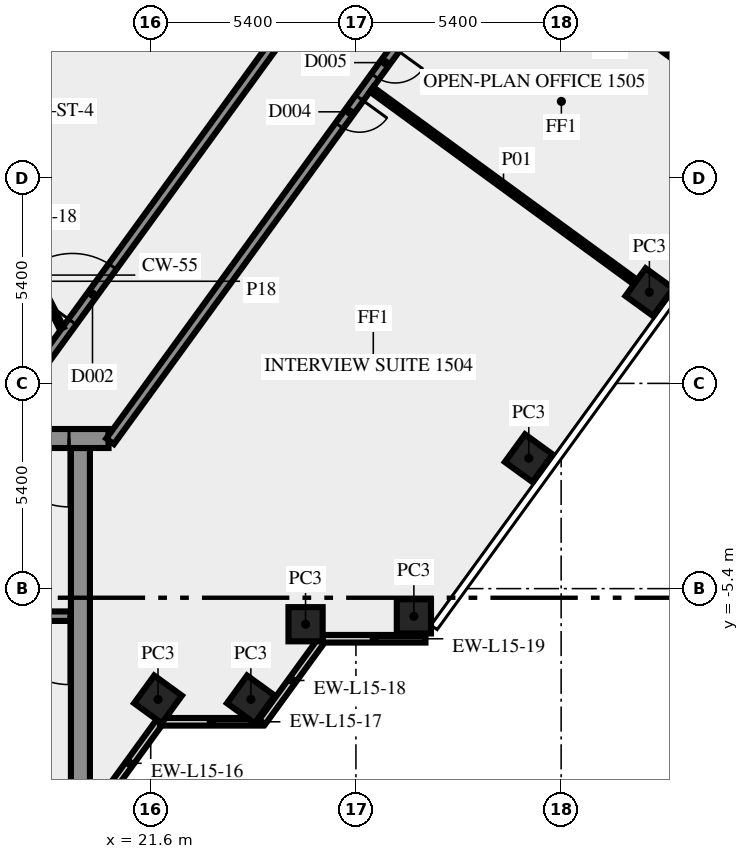
"""IFC4 building model, lengths in metres.
Left out: names, types, materials, properties, quantities, classifications, styles, units other than length and angle.
Written with IfcOpenShell. Run it as: python <this file> out.ifc"""

import sys

from ifc_helpers import new_model, si_unit, direction, frame, frame_2d, origin, origin_2d, place, context, subcontext, project, spatial, rectangle, extrude, element, fill, save


model = new_model("IFC4")
c1 = context("Model", 3, precision=1e-05, world=origin(), true_north=direction((0.0, 1.0)))
c2 = subcontext(c1, "Body", "Model", "MODEL_VIEW")
j1 = project(units=[si_unit("LENGTHUNIT", "METRE"), si_unit("PLANEANGLEUNIT", "RADIAN")], contexts=[c1])
p1 = place(None, origin())
s1 = spatial("IfcSite", under=j1, at=p1, CompositionType="ELEMENT")
p2 = place(p1, origin())
s2 = spatial("IfcBuilding", under=s1, at=p2, CompositionType="ELEMENT")
p3 = place(p2, frame((0.0, 0.0, 67.0)))
s3 = spatial("IfcBuildingStorey", under=s2, at=p3, CompositionType="ELEMENT", Elevation=67.0)
for number, where, z_axis, x_axis in (
    (1, (21.792, -8.315, 0.0), (0.0, 0.0, 1.0), (0.588, 0.809, 0.0)),
    (2, (24.235, -8.315, 0.0), (0.0, 0.0, 1.0), (0.588, 0.809, 0.0)),
    (3, (25.674, -6.337, 0.0), (0.0, 0.0, 1.0), (1.0, 0.0, 0.0)),
    (4, (28.525, -6.13, 0.0), (0.0, 0.0, 1.0), (1.0, 0.0, 0.0)),
    (5, (31.548, -1.969, 0.0), (0.0, 0.0, 1.0), (0.588, 0.809, 0.0)),
    (6, (34.722, 2.4, 0.0), (0.0, 0.0, 1.0), (0.588, 0.809, 0.0)),
):
    element("IfcColumn", number, at=place(p3, frame(where, z_axis=z_axis, x_axis=x_axis)), inside=s3, PredefinedType="COLUMN", context=c2, shape_type="SweptSolid", body=[
        extrude(rectangle(XDim=0.9, YDim=0.9, at=origin_2d()), origin(), (0.0, 0.0, 1.0), 3.65),
    ])
p4 = place(p3, frame((20.253, -11.083, 0.0), z_axis=(0.0, 0.0, 1.0), x_axis=(0.587766567315, 0.809030569476, 0.0)))
e7 = element("IfcWall", 7, at=p4, inside=s3, PredefinedType="SOLIDWALL", context=c2, shape_type="SweptSolid", body=[
    extrude(rectangle(XDim=2.688, YDim=0.2, at=frame_2d((1.344, 0.0))), origin(), (0.0, 0.0, 1.0), 3.65),
])
p5 = place(p3, frame((21.843, -8.904, 0.0), z_axis=(0.0, 0.0, 1.0), x_axis=(1.0, 0.0, 0.0)))
e8 = element("IfcWall", 8, at=p5, inside=s3, PredefinedType="SOLIDWALL", context=c2, shape_type="SweptSolid", body=[
    extrude(rectangle(XDim=2.7, YDim=0.2, at=frame_2d((1.35, 0.0))), origin(), (0.0, 0.0, 1.0), 3.65),
])
p6 = place(p3, frame((24.533, -8.909, 0.0), z_axis=(0.0, 0.0, 1.0), x_axis=(0.587720002413, 0.809064397168, 0.0)))
e9 = element("IfcWall", 9, at=p6, inside=s3, PredefinedType="SOLIDWALL", context=c2, shape_type="SweptSolid", body=[
    extrude(rectangle(XDim=2.7, YDim=0.2, at=frame_2d((1.35, 0.0))), origin(), (0.0, 0.0, 1.0), 3.65),
])
p7 = place(p3, frame((26.13, -6.719, 0.0), z_axis=(0.0, 0.0, 1.0), x_axis=(1.0, 0.0, 0.0)))
e10 = element("IfcWall", 10, at=p7, inside=s3, PredefinedType="SOLIDWALL", context=c2, shape_type="SweptSolid", body=[
    extrude(rectangle(XDim=2.7, YDim=0.2, at=frame_2d((1.35, 0.0))), origin(), (0.0, 0.0, 1.0), 3.65),
])
p8 = place(p3, frame((19.75, -10.5, 0.0), z_axis=(0.0, 0.0, 1.0), x_axis=(0.0, 1.0, 0.0)))
e11 = element("IfcWall", 11, at=p8, inside=s3, PredefinedType="SHEAR", context=c2, shape_type="SweptSolid", body=[
    extrude(rectangle(XDim=8.8, YDim=0.5, at=frame_2d((4.4, 0.0))), origin(), (0.0, 0.0, 1.0), 3.65),
])
p9 = place(p3, frame((19.5, -6.125, 0.0), z_axis=(0.0, 0.0, 1.0), x_axis=(-1.0, 0.0, 0.0)))
e12 = element("IfcWall", 12, at=p9, inside=s3, PredefinedType="SHEAR", context=c2, shape_type="SweptSolid", body=[
    extrude(rectangle(XDim=8.05, YDim=0.25, at=frame_2d((4.025, 0.0))), origin(), (0.0, 0.0, 1.0), 3.65),
])
p10 = place(p9, frame((0.05, 0.0, 0.0)))
e13 = element("IfcOpeningElement", 13, at=p10, cuts=e12, PredefinedType="OPENING", context=c2, shape_type="SweptSolid", body=[
    extrude(rectangle(XDim=1.8, YDim=2.1, at=frame_2d((0.9, 1.05))), frame((0.0, 0.135, 0.0), z_axis=(0.0, -1.0, 0.0), x_axis=(1.0, 0.0, 0.0)), (0.0, 0.0, 1.0), 0.27),
])
p11 = place(p3, frame((20.49, -1.45, 0.0), z_axis=(0.0, 0.0, 1.0), x_axis=(-1.0, 0.0, 0.0)))
e14 = element("IfcWall", 14, at=p11, inside=s3, PredefinedType="SHEAR", context=c2, shape_type="SweptSolid", body=[
    extrude(rectangle(XDim=40.98, YDim=0.5, at=frame_2d((20.49, 0.0))), origin(), (0.0, 0.0, 1.0), 3.65),
])
p12 = place(p11, frame((38.14, 0.0, 0.0)))
e15 = element("IfcOpeningElement", 15, at=p12, cuts=e14, PredefinedType="OPENING", context=c2, shape_type="SweptSolid", body=[
    extrude(rectangle(XDim=1.8, YDim=2.1, at=frame_2d((0.9, 1.05))), frame((0.0, 0.26, 0.0), z_axis=(0.0, -1.0, 0.0), x_axis=(1.0, 0.0, 0.0)), (0.0, 0.0, 1.0), 0.52),
])
p13 = place(p11, frame((35.89, 0.0, 0.0)))
e16 = element("IfcOpeningElement", 16, at=p13, cuts=e14, PredefinedType="OPENING", context=c2, shape_type="SweptSolid", body=[
    extrude(rectangle(XDim=0.9, YDim=2.1, at=frame_2d((0.45, 1.05))), frame((0.0, 0.26, 0.0), z_axis=(0.0, -1.0, 0.0), x_axis=(1.0, 0.0, 0.0)), (0.0, 0.0, 1.0), 0.52),
])
p14 = place(p11, frame((32.94, 0.0, 0.0)))
e17 = element("IfcOpeningElement", 17, at=p14, cuts=e14, PredefinedType="OPENING", context=c2, shape_type="SweptSolid", body=[
    extrude(rectangle(XDim=0.9, YDim=2.1, at=frame_2d((0.45, 1.05))), frame((0.0, 0.26, 0.0), z_axis=(0.0, -1.0, 0.0), x_axis=(1.0, 0.0, 0.0)), (0.0, 0.0, 1.0), 0.52),
])
p15 = place(p11, frame((21.765, 0.0, 0.0)))
e18 = element("IfcOpeningElement", 18, at=p15, cuts=e14, PredefinedType="OPENING", context=c2, shape_type="SweptSolid", body=[
    extrude(rectangle(XDim=2.0, YDim=2.1, at=frame_2d((1.0, 1.05))), frame((0.0, 0.26, 0.0), z_axis=(0.0, -1.0, 0.0), x_axis=(1.0, 0.0, 0.0)), (0.0, 0.0, 1.0), 0.52),
])
p16 = place(p11, frame((7.14, 0.0, 0.0)))
e19 = element("IfcOpeningElement", 19, at=p16, cuts=e14, PredefinedType="OPENING", context=c2, shape_type="SweptSolid", body=[
    extrude(rectangle(XDim=0.9, YDim=2.1, at=frame_2d((0.45, 1.05))), frame((0.0, 0.26, 0.0), z_axis=(0.0, -1.0, 0.0), x_axis=(1.0, 0.0, 0.0)), (0.0, 0.0, 1.0), 0.52),
])
p17 = place(p11, frame((5.028, 0.0, 0.0)))
e20 = element("IfcOpeningElement", 20, at=p17, cuts=e14, PredefinedType="OPENING", context=c2, shape_type="SweptSolid", body=[
    extrude(rectangle(XDim=0.8, YDim=2.1, at=frame_2d((0.4, 1.05))), frame((0.0, 0.26, 0.0), z_axis=(0.0, -1.0, 0.0), x_axis=(1.0, 0.0, 0.0)), (0.0, 0.0, 1.0), 0.52),
])
p18 = place(p11, frame((3.452, 0.0, 0.0)))
e21 = element("IfcOpeningElement", 21, at=p18, cuts=e14, PredefinedType="OPENING", context=c2, shape_type="SweptSolid", body=[
    extrude(rectangle(XDim=0.8, YDim=2.1, at=frame_2d((0.4, 1.05))), frame((0.0, 0.26, 0.0), z_axis=(0.0, -1.0, 0.0), x_axis=(1.0, 0.0, 0.0)), (0.0, 0.0, 1.0), 0.52),
])
p19 = place(p11, frame((1.04, 0.0, 0.0)))
e22 = element("IfcOpeningElement", 22, at=p19, cuts=e14, PredefinedType="OPENING", context=c2, shape_type="SweptSolid", body=[
    extrude(rectangle(XDim=1.8, YDim=2.1, at=frame_2d((0.9, 1.05))), frame((0.0, 0.26, 0.0), z_axis=(0.0, -1.0, 0.0), x_axis=(1.0, 0.0, 0.0)), (0.0, 0.0, 1.0), 0.52),
])
p20 = place(p3, frame((17.545, -1.125, 0.0), z_axis=(0.0, 0.0, 1.0), x_axis=(0.587786323093, 0.809016216391, 0.0)))
e23 = element("IfcWall", 23, at=p20, inside=s3, PredefinedType="SOLIDWALL", context=c2, shape_type="SweptSolid", body=[
    extrude(rectangle(XDim=33.493, YDim=0.25, at=frame_2d((16.747, 0.0))), origin(), (0.0, 0.0, 1.0), 3.65),
])
p21 = place(p20, frame((27.458, 0.0, 0.0)))
e24 = element("IfcOpeningElement", 24, at=p21, cuts=e23, PredefinedType="OPENING", context=c2, shape_type="SweptSolid", body=[
    extrude(rectangle(XDim=1.8, YDim=2.1, at=frame_2d((0.9, 1.05))), frame((0.0, 0.135, 0.0), z_axis=(0.0, -1.0, 0.0), x_axis=(1.0, 0.0, 0.0)), (0.0, 0.0, 1.0), 0.27),
])
p22 = place(p20, frame((3.392, 0.0, 0.0)))
e25 = element("IfcOpeningElement", 25, at=p22, cuts=e23, PredefinedType="OPENING", context=c2, shape_type="SweptSolid", body=[
    extrude(rectangle(XDim=1.8, YDim=2.1, at=frame_2d((0.9, 1.05))), frame((0.0, 0.135, 0.0), z_axis=(0.0, -1.0, 0.0), x_axis=(1.0, 0.0, 0.0)), (0.0, 0.0, 1.0), 0.27),
])
p23 = place(p20, frame((32.253, 0.0, 0.0)))
e26 = element("IfcOpeningElement", 26, at=p23, cuts=e23, PredefinedType="OPENING", context=c2, shape_type="SweptSolid", body=[
    extrude(rectangle(XDim=0.9, YDim=2.1, at=frame_2d((0.45, 1.05))), frame((0.0, 0.135, 0.0), z_axis=(0.0, -1.0, 0.0), x_axis=(1.0, 0.0, 0.0)), (0.0, 0.0, 1.0), 0.27),
])
p24 = place(p3, frame((43.467, 30.045, 0.0), z_axis=(0.0, 0.0, 1.0), x_axis=(-0.587784726077, -0.809017376692, 0.0)))
e27 = element("IfcWall", 27, at=p24, inside=s3, PredefinedType="SOLIDWALL", context=c2, shape_type="SweptSolid", body=[
    extrude(rectangle(XDim=39.02, YDim=0.25, at=frame_2d((19.51, 0.0))), origin(), (0.0, 0.0, 1.0), 3.65),
])
p25 = place(p24, frame((26.254, 0.0, 0.0)))
e28 = element("IfcOpeningElement", 28, at=p25, cuts=e27, PredefinedType="OPENING", context=c2, shape_type="SweptSolid", body=[
    extrude(rectangle(XDim=0.9, YDim=2.1, at=frame_2d((0.45, 1.05))), frame((0.0, 0.135, 0.0), z_axis=(0.0, -1.0, 0.0), x_axis=(1.0, 0.0, 0.0)), (0.0, 0.0, 1.0), 0.27),
])
p26 = place(p24, frame((2.205, 0.0, 0.0)))
e29 = element("IfcOpeningElement", 29, at=p26, cuts=e27, PredefinedType="OPENING", context=c2, shape_type="SweptSolid", body=[
    extrude(rectangle(XDim=0.9, YDim=2.1, at=frame_2d((0.45, 1.05))), frame((0.0, 0.135, 0.0), z_axis=(0.0, -1.0, 0.0), x_axis=(1.0, 0.0, 0.0)), (0.0, 0.0, 1.0), 0.27),
])
p27 = place(p24, frame((27.855, 0.0, 0.0)))
e30 = element("IfcOpeningElement", 30, at=p27, cuts=e27, PredefinedType="OPENING", context=c2, shape_type="SweptSolid", body=[
    extrude(rectangle(XDim=0.9, YDim=2.1, at=frame_2d((0.45, 1.05))), frame((0.0, 0.135, 0.0), z_axis=(0.0, -1.0, 0.0), x_axis=(1.0, 0.0, 0.0)), (0.0, 0.0, 1.0), 0.27),
])
p28 = place(p24, frame((18.155, 0.0, 0.0)))
e31 = element("IfcOpeningElement", 31, at=p28, cuts=e27, PredefinedType="OPENING", context=c2, shape_type="SweptSolid", body=[
    extrude(rectangle(XDim=0.9, YDim=2.1, at=frame_2d((0.45, 1.05))), frame((0.0, 0.135, 0.0), z_axis=(0.0, -1.0, 0.0), x_axis=(1.0, 0.0, 0.0)), (0.0, 0.0, 1.0), 0.27),
])
p29 = place(p24, frame((19.755, 0.0, 0.0)))
e32 = element("IfcOpeningElement", 32, at=p29, cuts=e27, PredefinedType="OPENING", context=c2, shape_type="SweptSolid", body=[
    extrude(rectangle(XDim=0.9, YDim=2.1, at=frame_2d((0.45, 1.05))), frame((0.0, 0.135, 0.0), z_axis=(0.0, -1.0, 0.0), x_axis=(1.0, 0.0, 0.0)), (0.0, 0.0, 1.0), 0.27),
])
p30 = place(p24, frame((0.224, 0.0, 0.0)))
e33 = element("IfcOpeningElement", 33, at=p30, cuts=e27, PredefinedType="OPENING", context=c2, shape_type="SweptSolid", body=[
    extrude(rectangle(XDim=0.9, YDim=2.1, at=frame_2d((0.45, 1.05))), frame((0.0, 0.135, 0.0), z_axis=(0.0, -1.0, 0.0), x_axis=(1.0, 0.0, 0.0)), (0.0, 0.0, 1.0), 0.27),
])
p31 = place(p3, frame((27.413, 7.735, 0.0), z_axis=(0.0, 0.0, 1.0), x_axis=(0.807664804385, -0.589641894507, 0.0)))
e34 = element("IfcWall", 34, at=p31, inside=s3, PredefinedType="PARTITIONING", context=c2, shape_type="SweptSolid", body=[
    extrude(rectangle(XDim=8.594, YDim=0.15, at=frame_2d((4.297, 0.0))), origin(), (0.0, 0.0, 1.0), 3.65),
])
p32 = place(p3, frame((37.516, 7.02, 0.0), z_axis=(0.0, 0.0, 1.0), x_axis=(-0.809002556908, 0.587805123248, 0.0)))
e35 = element("IfcWall", 35, at=p32, inside=s3, PredefinedType="PARTITIONING", context=c2, shape_type="SweptSolid", body=[
    extrude(rectangle(XDim=8.595, YDim=0.12, at=frame_2d((4.297, 0.0))), origin(), (0.0, 0.0, 1.0), 3.65),
])
p33 = place(p3, frame((32.174, 14.288, 0.0), z_axis=(0.0, 0.0, 1.0), x_axis=(0.807664588563, -0.589642190131, 0.0)))
e36 = element("IfcWall", 36, at=p33, inside=s3, PredefinedType="PARTITIONING", context=c2, shape_type="SweptSolid", body=[
    extrude(rectangle(XDim=9.55, YDim=0.12, at=frame_2d((4.775, 0.0))), origin(), (0.0, 0.0, 1.0), 2.75),
])
p34 = place(p3, frame((18.0, 3.925, 0.0), z_axis=(0.0, 0.0, 1.0), x_axis=(0.453950796792, -0.891026752736, 0.0)))
e37 = element("IfcWall", 37, at=p34, inside=s3, PredefinedType="PARTITIONING", context=c2, shape_type="SweptSolid", body=[
    extrude(rectangle(XDim=2.778, YDim=0.12, at=frame_2d((1.389, 0.0))), origin(), (0.0, 0.0, 1.0), 3.65),
])
p35 = place(p10, origin())
e38 = element("IfcDoor", 38, at=p35, inside=s3, OperationType="DOUBLE_DOOR_SINGLE_SWING", PredefinedType="DOOR", context=c2, shape_type="SweptSolid", body=[
    extrude(rectangle(XDim=1.8, YDim=2.1, at=frame_2d((0.9, 1.05))), frame((0.0, 0.025, 0.0), z_axis=(0.0, -1.0, 0.0), x_axis=(1.0, 0.0, 0.0)), (0.0, 0.0, 1.0), 0.05),
])
fill(e13, e38)
p36 = place(p19, origin())
e39 = element("IfcDoor", 39, at=p36, inside=s3, OperationType="DOUBLE_DOOR_SINGLE_SWING", PredefinedType="DOOR", context=c2, shape_type="SweptSolid", body=[
    extrude(rectangle(XDim=1.8, YDim=2.1, at=frame_2d((0.9, 1.05))), frame((0.0, 0.025, 0.0), z_axis=(0.0, -1.0, 0.0), x_axis=(1.0, 0.0, 0.0)), (0.0, 0.0, 1.0), 0.05),
])
fill(e22, e39)
p37 = place(p25, origin())
e40 = element("IfcDoor", 40, at=p37, inside=s3, OperationType="SINGLE_SWING_RIGHT", PredefinedType="DOOR", context=c2, shape_type="SweptSolid", body=[
    extrude(rectangle(XDim=0.9, YDim=2.1, at=frame_2d((0.45, 1.05))), frame((0.0, 0.025, 0.0), z_axis=(0.0, -1.0, 0.0), x_axis=(1.0, 0.0, 0.0)), (0.0, 0.0, 1.0), 0.05),
])
fill(e28, e40)
p38 = place(p22, origin())
e41 = element("IfcDoor", 41, at=p38, inside=s3, OperationType="DOUBLE_DOOR_SINGLE_SWING", PredefinedType="DOOR", context=c2, shape_type="SweptSolid", body=[
    extrude(rectangle(XDim=1.8, YDim=2.1, at=frame_2d((0.9, 1.05))), frame((0.0, 0.025, 0.0), z_axis=(0.0, -1.0, 0.0), x_axis=(1.0, 0.0, 0.0)), (0.0, 0.0, 1.0), 0.05),
])
fill(e25, e41)
p39 = place(p27, origin())
e42 = element("IfcDoor", 42, at=p39, inside=s3, OperationType="SINGLE_SWING_LEFT", PredefinedType="DOOR", context=c2, shape_type="SweptSolid", body=[
    extrude(rectangle(XDim=0.9, YDim=2.1, at=frame_2d((0.45, 1.05))), frame((0.0, 0.025, 0.0), z_axis=(0.0, -1.0, 0.0), x_axis=(1.0, 0.0, 0.0)), (0.0, 0.0, 1.0), 0.05),
])
fill(e30, e42)
save(model, sys.argv[1])
